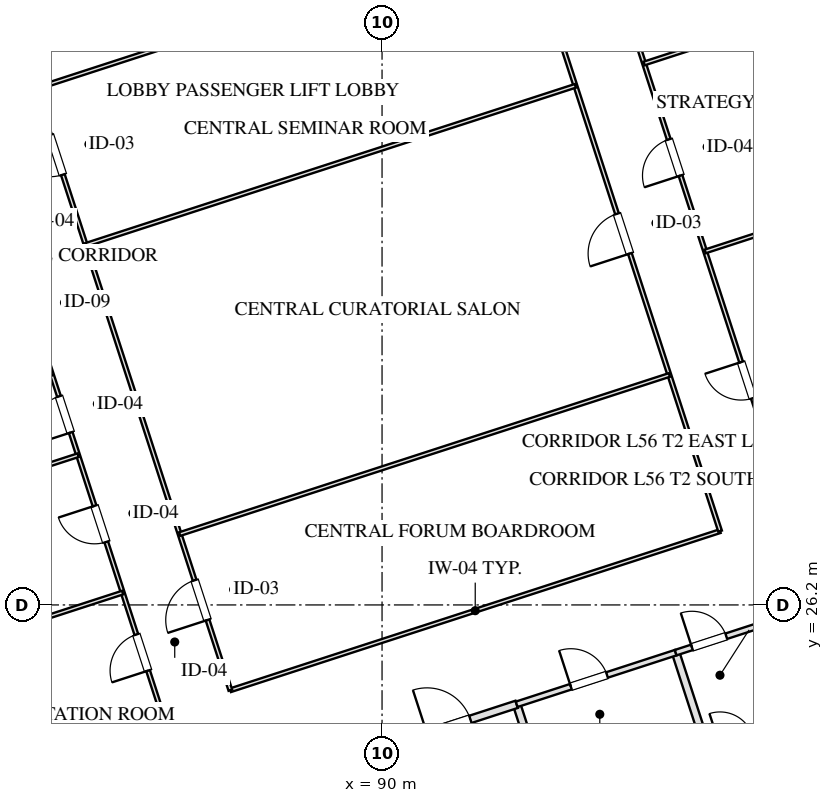
"""IFC4 building model, lengths in metres.
Left out: names, types, materials, properties, quantities, classifications, styles, units other than length and angle.
Written with IfcOpenShell. Run it as: python <this file> out.ifc"""

import sys

from ifc_helpers import new_model, si_unit, direction, frame, frame_2d, origin, place, context, subcontext, project, spatial, rectangle, extrude, element, fill, save


model = new_model("IFC4")
c1 = context("Model", 3, precision=1e-05, world=origin(), true_north=direction((0.0, 1.0)))
c2 = subcontext(c1, "Body", "Model", "MODEL_VIEW")
j1 = project(units=[si_unit("LENGTHUNIT", "METRE"), si_unit("PLANEANGLEUNIT", "RADIAN")], contexts=[c1])
p1 = place(None, origin())
s1 = spatial("IfcSite", under=j1, at=p1, CompositionType="ELEMENT")
p2 = place(p1, origin())
s2 = spatial("IfcBuilding", under=s1, at=p2, CompositionType="ELEMENT")
p3 = place(p2, frame((0.0, 0.0, 209.3)))
s3 = spatial("IfcBuildingStorey", under=s2, at=p3, CompositionType="ELEMENT", Elevation=209.3)
p4 = place(p3, frame((82.618, 11.414, 0.0), z_axis=(0.0, 0.0, 1.0), x_axis=(-0.309016491071, 0.951056679828, 0.0)))
e1 = element("IfcWall", 1, at=p4, inside=s3, PredefinedType="SOLIDWALL", context=c2, shape_type="SweptSolid", body=[
    extrude(rectangle(XDim=38.4, YDim=0.4, at=frame_2d((19.2, 0.0))), origin(), (0.0, 0.0, 1.0), 2.61),
])
p5 = place(p4, frame((20.75, 0.0, 0.75)))
e2 = element("IfcOpeningElement", 2, at=p5, cuts=e1, PredefinedType="OPENING", context=c2, shape_type="SweptSolid", body=[
    extrude(rectangle(XDim=2.1, YDim=1.46, at=frame_2d((1.05, 0.73))), frame((0.0, 0.21, 0.0), z_axis=(0.0, -1.0, 0.0), x_axis=(1.0, 0.0, 0.0)), (0.0, 0.0, 1.0), 0.42),
])
p6 = place(p4, frame((24.55, 0.0, 0.75)))
e3 = element("IfcOpeningElement", 3, at=p6, cuts=e1, PredefinedType="OPENING", context=c2, shape_type="SweptSolid", body=[
    extrude(rectangle(XDim=2.1, YDim=1.46, at=frame_2d((1.05, 0.73))), frame((0.0, 0.21, 0.0), z_axis=(0.0, -1.0, 0.0), x_axis=(1.0, 0.0, 0.0)), (0.0, 0.0, 1.0), 0.42),
])
p7 = place(p4, frame((15.55, 0.0, 0.0)))
e4 = element("IfcOpeningElement", 4, at=p7, cuts=e1, PredefinedType="OPENING", context=c2, shape_type="SweptSolid", body=[
    extrude(rectangle(XDim=1.1, YDim=2.15, at=frame_2d((0.55, 1.075))), frame((0.0, 0.21, 0.0), z_axis=(0.0, -1.0, 0.0), x_axis=(1.0, 0.0, 0.0)), (0.0, 0.0, 1.0), 0.42),
])
p8 = place(p3, frame((97.382, 56.586, 0.0), z_axis=(0.0, 0.0, 1.0), x_axis=(0.309016491071, -0.951056679828, 0.0)))
e5 = element("IfcWall", 5, at=p8, inside=s3, PredefinedType="SOLIDWALL", context=c2, shape_type="SweptSolid", body=[
    extrude(rectangle(XDim=38.4, YDim=0.4, at=frame_2d((19.2, 0.0))), origin(), (0.0, 0.0, 1.0), 2.61),
])
p9 = place(p8, frame((15.55, 0.0, 0.75)))
e6 = element("IfcOpeningElement", 6, at=p9, cuts=e5, PredefinedType="OPENING", context=c2, shape_type="SweptSolid", body=[
    extrude(rectangle(XDim=2.1, YDim=1.46, at=frame_2d((1.05, 0.73))), frame((0.0, 0.21, 0.0), z_axis=(0.0, -1.0, 0.0), x_axis=(1.0, 0.0, 0.0)), (0.0, 0.0, 1.0), 0.42),
])
p10 = place(p8, frame((11.75, 0.0, 0.75)))
e7 = element("IfcOpeningElement", 7, at=p10, cuts=e5, PredefinedType="OPENING", context=c2, shape_type="SweptSolid", body=[
    extrude(rectangle(XDim=2.1, YDim=1.46, at=frame_2d((1.05, 0.73))), frame((0.0, 0.21, 0.0), z_axis=(0.0, -1.0, 0.0), x_axis=(1.0, 0.0, 0.0)), (0.0, 0.0, 1.0), 0.42),
])
p11 = place(p8, frame((23.05, 0.0, 0.0)))
e8 = element("IfcOpeningElement", 8, at=p11, cuts=e5, PredefinedType="OPENING", context=c2, shape_type="SweptSolid", body=[
    extrude(rectangle(XDim=1.1, YDim=2.15, at=frame_2d((0.55, 1.075))), frame((0.0, 0.21, 0.0), z_axis=(0.0, -1.0, 0.0), x_axis=(1.0, 0.0, 0.0)), (0.0, 0.0, 1.0), 0.42),
])
p12 = place(p3, frame((93.542, 23.585, 0.0), z_axis=(0.0, 0.0, 1.0), x_axis=(0.309042196757, -0.951048327176, 0.0)))
e9 = element("IfcWall", 9, at=p12, inside=s3, PredefinedType="PARTITIONING", context=c2, shape_type="SweptSolid", body=[
    extrude(rectangle(XDim=8.43, YDim=0.2, at=frame_2d((4.215, 0.0))), origin(), (0.0, 0.0, 1.0), 3.175),
])
p13 = place(p3, frame((89.899, 22.401, 0.0), z_axis=(0.0, 0.0, 1.0), x_axis=(0.951046716504, 0.309047153403, 0.0)))
e10 = element("IfcWall", 10, at=p13, inside=s3, PredefinedType="PARTITIONING", context=c2, shape_type="SweptSolid", body=[
    extrude(rectangle(XDim=3.83, YDim=0.2, at=frame_2d((1.915, 0.0))), origin(), (0.0, 0.0, 1.0), 3.175),
])
p14 = place(p13, frame((1.35, 0.0, 0.0)))
e11 = element("IfcOpeningElement", 11, at=p14, cuts=e10, PredefinedType="OPENING", context=c2, shape_type="SweptSolid", body=[
    extrude(rectangle(XDim=1.2, YDim=2.05, at=frame_2d((0.6, 1.025))), frame((0.0, 0.11, 0.0), z_axis=(0.0, -1.0, 0.0), x_axis=(1.0, 0.0, 0.0)), (0.0, 0.0, 1.0), 0.22),
])
p15 = place(p3, frame((97.727, 24.944, 0.0), z_axis=(0.0, 0.0, 1.0), x_axis=(0.309016001439, -0.951056838919, 0.0)))
e12 = element("IfcWall", 12, at=p15, inside=s3, PredefinedType="PARTITIONING", context=c2, shape_type="SweptSolid", body=[
    extrude(rectangle(XDim=8.43, YDim=0.2, at=frame_2d((4.215, 0.0))), origin(), (0.0, 0.0, 1.0), 3.175),
])
p16 = place(p3, frame((93.542, 23.585, 0.0), z_axis=(0.0, 0.0, 1.0), x_axis=(0.951063829732, 0.308994485023, 0.0)))
e13 = element("IfcWall", 13, at=p16, inside=s3, PredefinedType="PARTITIONING", context=c2, shape_type="SweptSolid", body=[
    extrude(rectangle(XDim=4.4, YDim=0.15, at=frame_2d((2.2, 0.0))), origin(), (0.0, 0.0, 1.0), 3.175),
])
p17 = place(p16, frame((1.5, 0.0, 0.0)))
e14 = element("IfcOpeningElement", 14, at=p17, cuts=e13, PredefinedType="OPENING", context=c2, shape_type="SweptSolid", body=[
    extrude(rectangle(XDim=1.0, YDim=2.05, at=frame_2d((0.5, 1.025))), frame((0.0, 0.085, 0.0), z_axis=(0.0, -1.0, 0.0), x_axis=(1.0, 0.0, 0.0)), (0.0, 0.0, 1.0), 0.17),
])
p18 = place(p3, frame((97.727, 24.944, 0.0), z_axis=(0.0, 0.0, 1.0), x_axis=(0.951036872128, 0.309077446369, 0.0)))
e15 = element("IfcWall", 15, at=p18, inside=s3, PredefinedType="PARTITIONING", context=c2, shape_type="SweptSolid", body=[
    extrude(rectangle(XDim=3.2, YDim=0.15, at=frame_2d((1.6, 0.0))), origin(), (0.0, 0.0, 1.0), 3.175),
])
p19 = place(p18, frame((0.45, 0.0, 0.0)))
e16 = element("IfcOpeningElement", 16, at=p19, cuts=e15, PredefinedType="OPENING", context=c2, shape_type="SweptSolid", body=[
    extrude(rectangle(XDim=0.95, YDim=2.05, at=frame_2d((0.475, 1.025))), frame((0.0, 0.085, 0.0), z_axis=(0.0, -1.0, 0.0), x_axis=(1.0, 0.0, 0.0)), (0.0, 0.0, 1.0), 0.17),
])
p20 = place(p3, frame((98.561, 22.376, 0.0), z_axis=(0.0, 0.0, 1.0), x_axis=(0.95104415986, 0.309055020985, 0.0)))
e17 = element("IfcWall", 17, at=p20, inside=s3, PredefinedType="PARTITIONING", context=c2, shape_type="SweptSolid", body=[
    extrude(rectangle(XDim=3.2, YDim=0.15, at=frame_2d((1.6, 0.0))), origin(), (0.0, 0.0, 1.0), 3.175),
])
p21 = place(p20, frame((0.35, 0.0, 0.0)))
e18 = element("IfcOpeningElement", 18, at=p21, cuts=e17, PredefinedType="OPENING", context=c2, shape_type="SweptSolid", body=[
    extrude(rectangle(XDim=0.9, YDim=2.05, at=frame_2d((0.45, 1.025))), frame((0.0, 0.085, 0.0), z_axis=(0.0, -1.0, 0.0), x_axis=(1.0, 0.0, 0.0)), (0.0, 0.0, 1.0), 0.17),
])
p22 = place(p20, frame((2.1, 0.0, 0.0)))
e19 = element("IfcOpeningElement", 19, at=p22, cuts=e17, PredefinedType="OPENING", context=c2, shape_type="SweptSolid", body=[
    extrude(rectangle(XDim=0.9, YDim=2.05, at=frame_2d((0.45, 1.025))), frame((0.0, 0.085, 0.0), z_axis=(0.0, -1.0, 0.0), x_axis=(1.0, 0.0, 0.0)), (0.0, 0.0, 1.0), 0.17),
])
p23 = place(p3, frame((79.447, 21.823, 0.0), z_axis=(0.0, 0.0, 1.0), x_axis=(0.951048779938, 0.309040803421, 0.0)))
e20 = element("IfcWall", 20, at=p23, inside=s3, PredefinedType="MOVABLE", context=c2, shape_type="SweptSolid", body=[
    extrude(rectangle(XDim=5.0, YDim=0.1, at=frame_2d((2.5, 0.0))), origin(), (0.0, 0.0, 1.0), 3.175),
])
p24 = place(p3, frame((86.009, 23.955, 0.0), z_axis=(0.0, 0.0, 1.0), x_axis=(0.951059488241, 0.309007847517, 0.0)))
e21 = element("IfcWall", 21, at=p24, inside=s3, PredefinedType="MOVABLE", context=c2, shape_type="SweptSolid", body=[
    extrude(rectangle(XDim=13.55, YDim=0.1, at=frame_2d((6.775, 0.0))), origin(), (0.0, 0.0, 1.0), 3.175),
])
p25 = place(p3, frame((80.867, 39.781, 0.0), z_axis=(0.0, 0.0, 1.0), x_axis=(0.951054192928, 0.309024144872, 0.0)))
e22 = element("IfcWall", 22, at=p25, inside=s3, PredefinedType="MOVABLE", context=c2, shape_type="SweptSolid", body=[
    extrude(rectangle(XDim=13.55, YDim=0.1, at=frame_2d((6.775, 0.0))), origin(), (0.0, 0.0, 1.0), 3.175),
])
p26 = place(p3, frame((84.202, 23.368, 0.0), z_axis=(0.0, 0.0, 1.0), x_axis=(-0.309022042254, 0.951054876125, 0.0)))
e23 = element("IfcWall", 23, at=p26, inside=s3, PredefinedType="MOVABLE", context=c2, shape_type="SweptSolid", body=[
    extrude(rectangle(XDim=16.64, YDim=0.1, at=frame_2d((8.32, 0.0))), origin(), (0.0, 0.0, 1.0), 3.175),
])
p27 = place(p26, frame((1.16, 0.0, 0.0)))
e24 = element("IfcOpeningElement", 24, at=p27, cuts=e23, PredefinedType="OPENING", context=c2, shape_type="SweptSolid", body=[
    extrude(rectangle(XDim=1.0, YDim=2.05, at=frame_2d((0.5, 1.025))), frame((0.0, 0.06, 0.0), z_axis=(0.0, -1.0, 0.0), x_axis=(1.0, 0.0, 0.0)), (0.0, 0.0, 1.0), 0.12),
])
p28 = place(p26, frame((4.72, 0.0, 0.0)))
e25 = element("IfcOpeningElement", 25, at=p28, cuts=e23, PredefinedType="OPENING", context=c2, shape_type="SweptSolid", body=[
    extrude(rectangle(XDim=1.0, YDim=2.05, at=frame_2d((0.5, 1.025))), frame((0.0, 0.06, 0.0), z_axis=(0.0, -1.0, 0.0), x_axis=(1.0, 0.0, 0.0)), (0.0, 0.0, 1.0), 0.12),
])
p29 = place(p26, frame((7.748, 0.0, 0.0)))
e26 = element("IfcOpeningElement", 26, at=p29, cuts=e23, PredefinedType="OPENING", context=c2, shape_type="SweptSolid", body=[
    extrude(rectangle(XDim=1.0, YDim=2.05, at=frame_2d((0.5, 1.025))), frame((0.0, 0.06, 0.0), z_axis=(0.0, -1.0, 0.0), x_axis=(1.0, 0.0, 0.0)), (0.0, 0.0, 1.0), 0.12),
])
p30 = place(p26, frame((10.623, 0.0, 0.0)))
e27 = element("IfcOpeningElement", 27, at=p30, cuts=e23, PredefinedType="OPENING", context=c2, shape_type="SweptSolid", body=[
    extrude(rectangle(XDim=0.85, YDim=2.05, at=frame_2d((0.425, 1.025))), frame((0.0, 0.06, 0.0), z_axis=(0.0, -1.0, 0.0), x_axis=(1.0, 0.0, 0.0)), (0.0, 0.0, 1.0), 0.12),
])
p31 = place(p26, frame((14.255, 0.0, 0.0)))
e28 = element("IfcOpeningElement", 28, at=p31, cuts=e23, PredefinedType="OPENING", context=c2, shape_type="SweptSolid", body=[
    extrude(rectangle(XDim=1.0, YDim=2.05, at=frame_2d((0.5, 1.025))), frame((0.0, 0.06, 0.0), z_axis=(0.0, -1.0, 0.0), x_axis=(1.0, 0.0, 0.0)), (0.0, 0.0, 1.0), 0.12),
])
p32 = place(p3, frame((86.009, 23.955, 0.0), z_axis=(0.0, 0.0, 1.0), x_axis=(-0.309022042254, 0.951054876125, 0.0)))
e29 = element("IfcWall", 29, at=p32, inside=s3, PredefinedType="MOVABLE", context=c2, shape_type="SweptSolid", body=[
    extrude(rectangle(XDim=16.64, YDim=0.1, at=frame_2d((8.32, 0.0))), origin(), (0.0, 0.0, 1.0), 3.175),
])
p33 = place(p32, frame((1.944, 0.0, 0.0)))
e30 = element("IfcOpeningElement", 30, at=p33, cuts=e29, PredefinedType="OPENING", context=c2, shape_type="SweptSolid", body=[
    extrude(rectangle(XDim=1.1, YDim=2.05, at=frame_2d((0.55, 1.025))), frame((0.0, 0.06, 0.0), z_axis=(0.0, -1.0, 0.0), x_axis=(1.0, 0.0, 0.0)), (0.0, 0.0, 1.0), 0.12),
])
p34 = place(p32, frame((14.264, 0.0, 0.0)))
e31 = element("IfcOpeningElement", 31, at=p34, cuts=e29, PredefinedType="OPENING", context=c2, shape_type="SweptSolid", body=[
    extrude(rectangle(XDim=1.1, YDim=2.05, at=frame_2d((0.55, 1.025))), frame((0.0, 0.06, 0.0), z_axis=(0.0, -1.0, 0.0), x_axis=(1.0, 0.0, 0.0)), (0.0, 0.0, 1.0), 0.12),
])
p35 = place(p3, frame((98.896, 28.142, 0.0), z_axis=(0.0, 0.0, 1.0), x_axis=(-0.30901773025, 0.951056277195, 0.0)))
e32 = element("IfcWall", 32, at=p35, inside=s3, PredefinedType="MOVABLE", context=c2, shape_type="SweptSolid", body=[
    extrude(rectangle(XDim=16.64, YDim=0.1, at=frame_2d((8.32, 0.0))), origin(), (0.0, 0.0, 1.0), 3.175),
])
p36 = place(p35, frame((7.68, 0.0, 0.0)))
e33 = element("IfcOpeningElement", 33, at=p36, cuts=e32, PredefinedType="OPENING", context=c2, shape_type="SweptSolid", body=[
    extrude(rectangle(XDim=1.1, YDim=2.05, at=frame_2d((0.55, 1.025))), frame((0.0, 0.06, 0.0), z_axis=(0.0, -1.0, 0.0), x_axis=(1.0, 0.0, 0.0)), (0.0, 0.0, 1.0), 0.12),
])
p37 = place(p3, frame((100.703, 28.729, 0.0), z_axis=(0.0, 0.0, 1.0), x_axis=(-0.30901773025, 0.951056277195, 0.0)))
e34 = element("IfcWall", 34, at=p37, inside=s3, PredefinedType="MOVABLE", context=c2, shape_type="SweptSolid", body=[
    extrude(rectangle(XDim=16.64, YDim=0.1, at=frame_2d((8.32, 0.0))), origin(), (0.0, 0.0, 1.0), 3.175),
])
p38 = place(p37, frame((3.06, 0.0, 0.0)))
e35 = element("IfcOpeningElement", 35, at=p38, cuts=e34, PredefinedType="OPENING", context=c2, shape_type="SweptSolid", body=[
    extrude(rectangle(XDim=1.0, YDim=2.05, at=frame_2d((0.5, 1.025))), frame((0.0, 0.06, 0.0), z_axis=(0.0, -1.0, 0.0), x_axis=(1.0, 0.0, 0.0)), (0.0, 0.0, 1.0), 0.12),
])
p39 = place(p37, frame((9.22, 0.0, 0.0)))
e36 = element("IfcOpeningElement", 36, at=p39, cuts=e34, PredefinedType="OPENING", context=c2, shape_type="SweptSolid", body=[
    extrude(rectangle(XDim=1.0, YDim=2.05, at=frame_2d((0.5, 1.025))), frame((0.0, 0.06, 0.0), z_axis=(0.0, -1.0, 0.0), x_axis=(1.0, 0.0, 0.0)), (0.0, 0.0, 1.0), 0.12),
])
p40 = place(p37, frame((13.98, 0.0, 0.0)))
e37 = element("IfcOpeningElement", 37, at=p40, cuts=e34, PredefinedType="OPENING", context=c2, shape_type="SweptSolid", body=[
    extrude(rectangle(XDim=1.0, YDim=2.05, at=frame_2d((0.5, 1.025))), frame((0.0, 0.06, 0.0), z_axis=(0.0, -1.0, 0.0), x_axis=(1.0, 0.0, 0.0)), (0.0, 0.0, 1.0), 0.12),
])
p41 = place(p3, frame((84.674, 28.063, 0.0), z_axis=(0.0, 0.0, 1.0), x_axis=(0.951054192928, 0.309024144872, 0.0)))
e38 = element("IfcWall", 38, at=p41, inside=s3, PredefinedType="MOVABLE", context=c2, shape_type="SweptSolid", body=[
    extrude(rectangle(XDim=13.55, YDim=0.1, at=frame_2d((6.775, 0.0))), origin(), (0.0, 0.0, 1.0), 3.175),
])
p42 = place(p3, frame((82.202, 35.672, 0.0), z_axis=(0.0, 0.0, 1.0), x_axis=(0.951059488241, 0.309007847517, 0.0)))
e39 = element("IfcWall", 39, at=p42, inside=s3, PredefinedType="MOVABLE", context=c2, shape_type="SweptSolid", body=[
    extrude(rectangle(XDim=13.55, YDim=0.1, at=frame_2d((6.775, 0.0))), origin(), (0.0, 0.0, 1.0), 3.175),
])
p43 = place(p3, frame((78.42, 24.98, 0.0), z_axis=(0.0, 0.0, 1.0), x_axis=(0.951053443117, 0.309026452484, 0.0)))
e40 = element("IfcWall", 40, at=p43, inside=s3, PredefinedType="MOVABLE", context=c2, shape_type="SweptSolid", body=[
    extrude(rectangle(XDim=5.0, YDim=0.1, at=frame_2d((2.5, 0.0))), origin(), (0.0, 0.0, 1.0), 3.175),
])
p44 = place(p3, frame((77.246, 28.594, 0.0), z_axis=(0.0, 0.0, 1.0), x_axis=(0.951048779938, 0.309040803421, 0.0)))
e41 = element("IfcWall", 41, at=p44, inside=s3, PredefinedType="MOVABLE", context=c2, shape_type="SweptSolid", body=[
    extrude(rectangle(XDim=5.0, YDim=0.1, at=frame_2d((2.5, 0.0))), origin(), (0.0, 0.0, 1.0), 3.175),
])
for number, where, z_axis, x_axis in (
    (42, (98.502, 35.501, 0.0), (0.0, 0.0, 1.0), (0.951, 0.309, 0.0)),
    (43, (96.896, 40.446, 0.0), (0.0, 0.0, 1.0), (0.951, 0.309, 0.0)),
):
    element("IfcWall", number, at=place(p3, frame(where, z_axis=z_axis, x_axis=x_axis)), inside=s3, PredefinedType="MOVABLE", context=c2, shape_type="SweptSolid", body=[
        extrude(rectangle(XDim=5.25, YDim=0.1, at=frame_2d((2.625, 0.0))), origin(), (0.0, 0.0, 1.0), 3.175),
    ])
p45 = place(p14, origin())
e44 = element("IfcDoor", 44, at=p45, inside=s3, OperationType="SINGLE_SWING_LEFT", PredefinedType="DOOR", context=c2, shape_type="SweptSolid", body=[
    extrude(rectangle(XDim=1.2, YDim=2.05, at=frame_2d((0.6, 1.025))), frame((0.0, 0.025, 0.0), z_axis=(0.0, -1.0, 0.0), x_axis=(1.0, 0.0, 0.0)), (0.0, 0.0, 1.0), 0.05),
])
fill(e11, e44)
p46 = place(p17, origin())
e45 = element("IfcDoor", 45, at=p46, inside=s3, OperationType="SINGLE_SWING_LEFT", PredefinedType="DOOR", context=c2, shape_type="SweptSolid", body=[
    extrude(rectangle(XDim=1.0, YDim=2.05, at=frame_2d((0.5, 1.025))), frame((0.0, 0.025, 0.0), z_axis=(0.0, -1.0, 0.0), x_axis=(1.0, 0.0, 0.0)), (0.0, 0.0, 1.0), 0.05),
])
fill(e14, e45)
p47 = place(p19, origin())
e46 = element("IfcDoor", 46, at=p47, inside=s3, OperationType="SINGLE_SWING_LEFT", PredefinedType="DOOR", context=c2, shape_type="SweptSolid", body=[
    extrude(rectangle(XDim=0.95, YDim=2.05, at=frame_2d((0.475, 1.025))), frame((0.0, 0.025, 0.0), z_axis=(0.0, -1.0, 0.0), x_axis=(1.0, 0.0, 0.0)), (0.0, 0.0, 1.0), 0.05),
])
fill(e16, e46)
p48 = place(p27, origin())
e47 = element("IfcDoor", 47, at=p48, inside=s3, OperationType="SINGLE_SWING_LEFT", PredefinedType="DOOR", context=c2, shape_type="SweptSolid", body=[
    extrude(rectangle(XDim=1.0, YDim=2.05, at=frame_2d((0.5, 1.025))), frame((0.0, 0.025, 0.0), z_axis=(0.0, -1.0, 0.0), x_axis=(1.0, 0.0, 0.0)), (0.0, 0.0, 1.0), 0.05),
])
fill(e24, e47)
p49 = place(p28, origin())
e48 = element("IfcDoor", 48, at=p49, inside=s3, OperationType="SINGLE_SWING_RIGHT", PredefinedType="DOOR", context=c2, shape_type="SweptSolid", body=[
    extrude(rectangle(XDim=1.0, YDim=2.05, at=frame_2d((0.5, 1.025))), frame((0.0, 0.025, 0.0), z_axis=(0.0, -1.0, 0.0), x_axis=(1.0, 0.0, 0.0)), (0.0, 0.0, 1.0), 0.05),
])
fill(e25, e48)
p50 = place(p29, origin())
e49 = element("IfcDoor", 49, at=p50, inside=s3, OperationType="SINGLE_SWING_LEFT", PredefinedType="DOOR", context=c2, shape_type="SweptSolid", body=[
    extrude(rectangle(XDim=1.0, YDim=2.05, at=frame_2d((0.5, 1.025))), frame((0.0, 0.025, 0.0), z_axis=(0.0, -1.0, 0.0), x_axis=(1.0, 0.0, 0.0)), (0.0, 0.0, 1.0), 0.05),
])
fill(e26, e49)
p51 = place(p33, origin())
e50 = element("IfcDoor", 50, at=p51, inside=s3, OperationType="SINGLE_SWING_LEFT", PredefinedType="DOOR", context=c2, shape_type="SweptSolid", body=[
    extrude(rectangle(XDim=1.1, YDim=2.05, at=frame_2d((0.55, 1.025))), frame((0.0, 0.025, 0.0), z_axis=(0.0, -1.0, 0.0), x_axis=(1.0, 0.0, 0.0)), (0.0, 0.0, 1.0), 0.05),
])
fill(e30, e50)
p52 = place(p34, origin())
e51 = element("IfcDoor", 51, at=p52, inside=s3, OperationType="SINGLE_SWING_RIGHT", PredefinedType="DOOR", context=c2, shape_type="SweptSolid", body=[
    extrude(rectangle(XDim=1.1, YDim=2.05, at=frame_2d((0.55, 1.025))), frame((0.0, 0.025, 0.0), z_axis=(0.0, -1.0, 0.0), x_axis=(1.0, 0.0, 0.0)), (0.0, 0.0, 1.0), 0.05),
])
fill(e31, e51)
p53 = place(p36, origin())
e52 = element("IfcDoor", 52, at=p53, inside=s3, OperationType="SINGLE_SWING_LEFT", PredefinedType="DOOR", context=c2, shape_type="SweptSolid", body=[
    extrude(rectangle(XDim=1.1, YDim=2.05, at=frame_2d((0.55, 1.025))), frame((0.0, 0.025, 0.0), z_axis=(0.0, -1.0, 0.0), x_axis=(1.0, 0.0, 0.0)), (0.0, 0.0, 1.0), 0.05),
])
fill(e33, e52)
p54 = place(p38, origin())
e53 = element("IfcDoor", 53, at=p54, inside=s3, OperationType="SINGLE_SWING_RIGHT", PredefinedType="DOOR", context=c2, shape_type="SweptSolid", body=[
    extrude(rectangle(XDim=1.0, YDim=2.05, at=frame_2d((0.5, 1.025))), frame((0.0, 0.025, 0.0), z_axis=(0.0, -1.0, 0.0), x_axis=(1.0, 0.0, 0.0)), (0.0, 0.0, 1.0), 0.05),
])
fill(e35, e53)
p55 = place(p39, origin())
e54 = element("IfcDoor", 54, at=p55, inside=s3, OperationType="SINGLE_SWING_LEFT", PredefinedType="DOOR", context=c2, shape_type="SweptSolid", body=[
    extrude(rectangle(XDim=1.0, YDim=2.05, at=frame_2d((0.5, 1.025))), frame((0.0, 0.025, 0.0), z_axis=(0.0, -1.0, 0.0), x_axis=(1.0, 0.0, 0.0)), (0.0, 0.0, 1.0), 0.05),
])
fill(e36, e54)
save(model, sys.argv[1])
